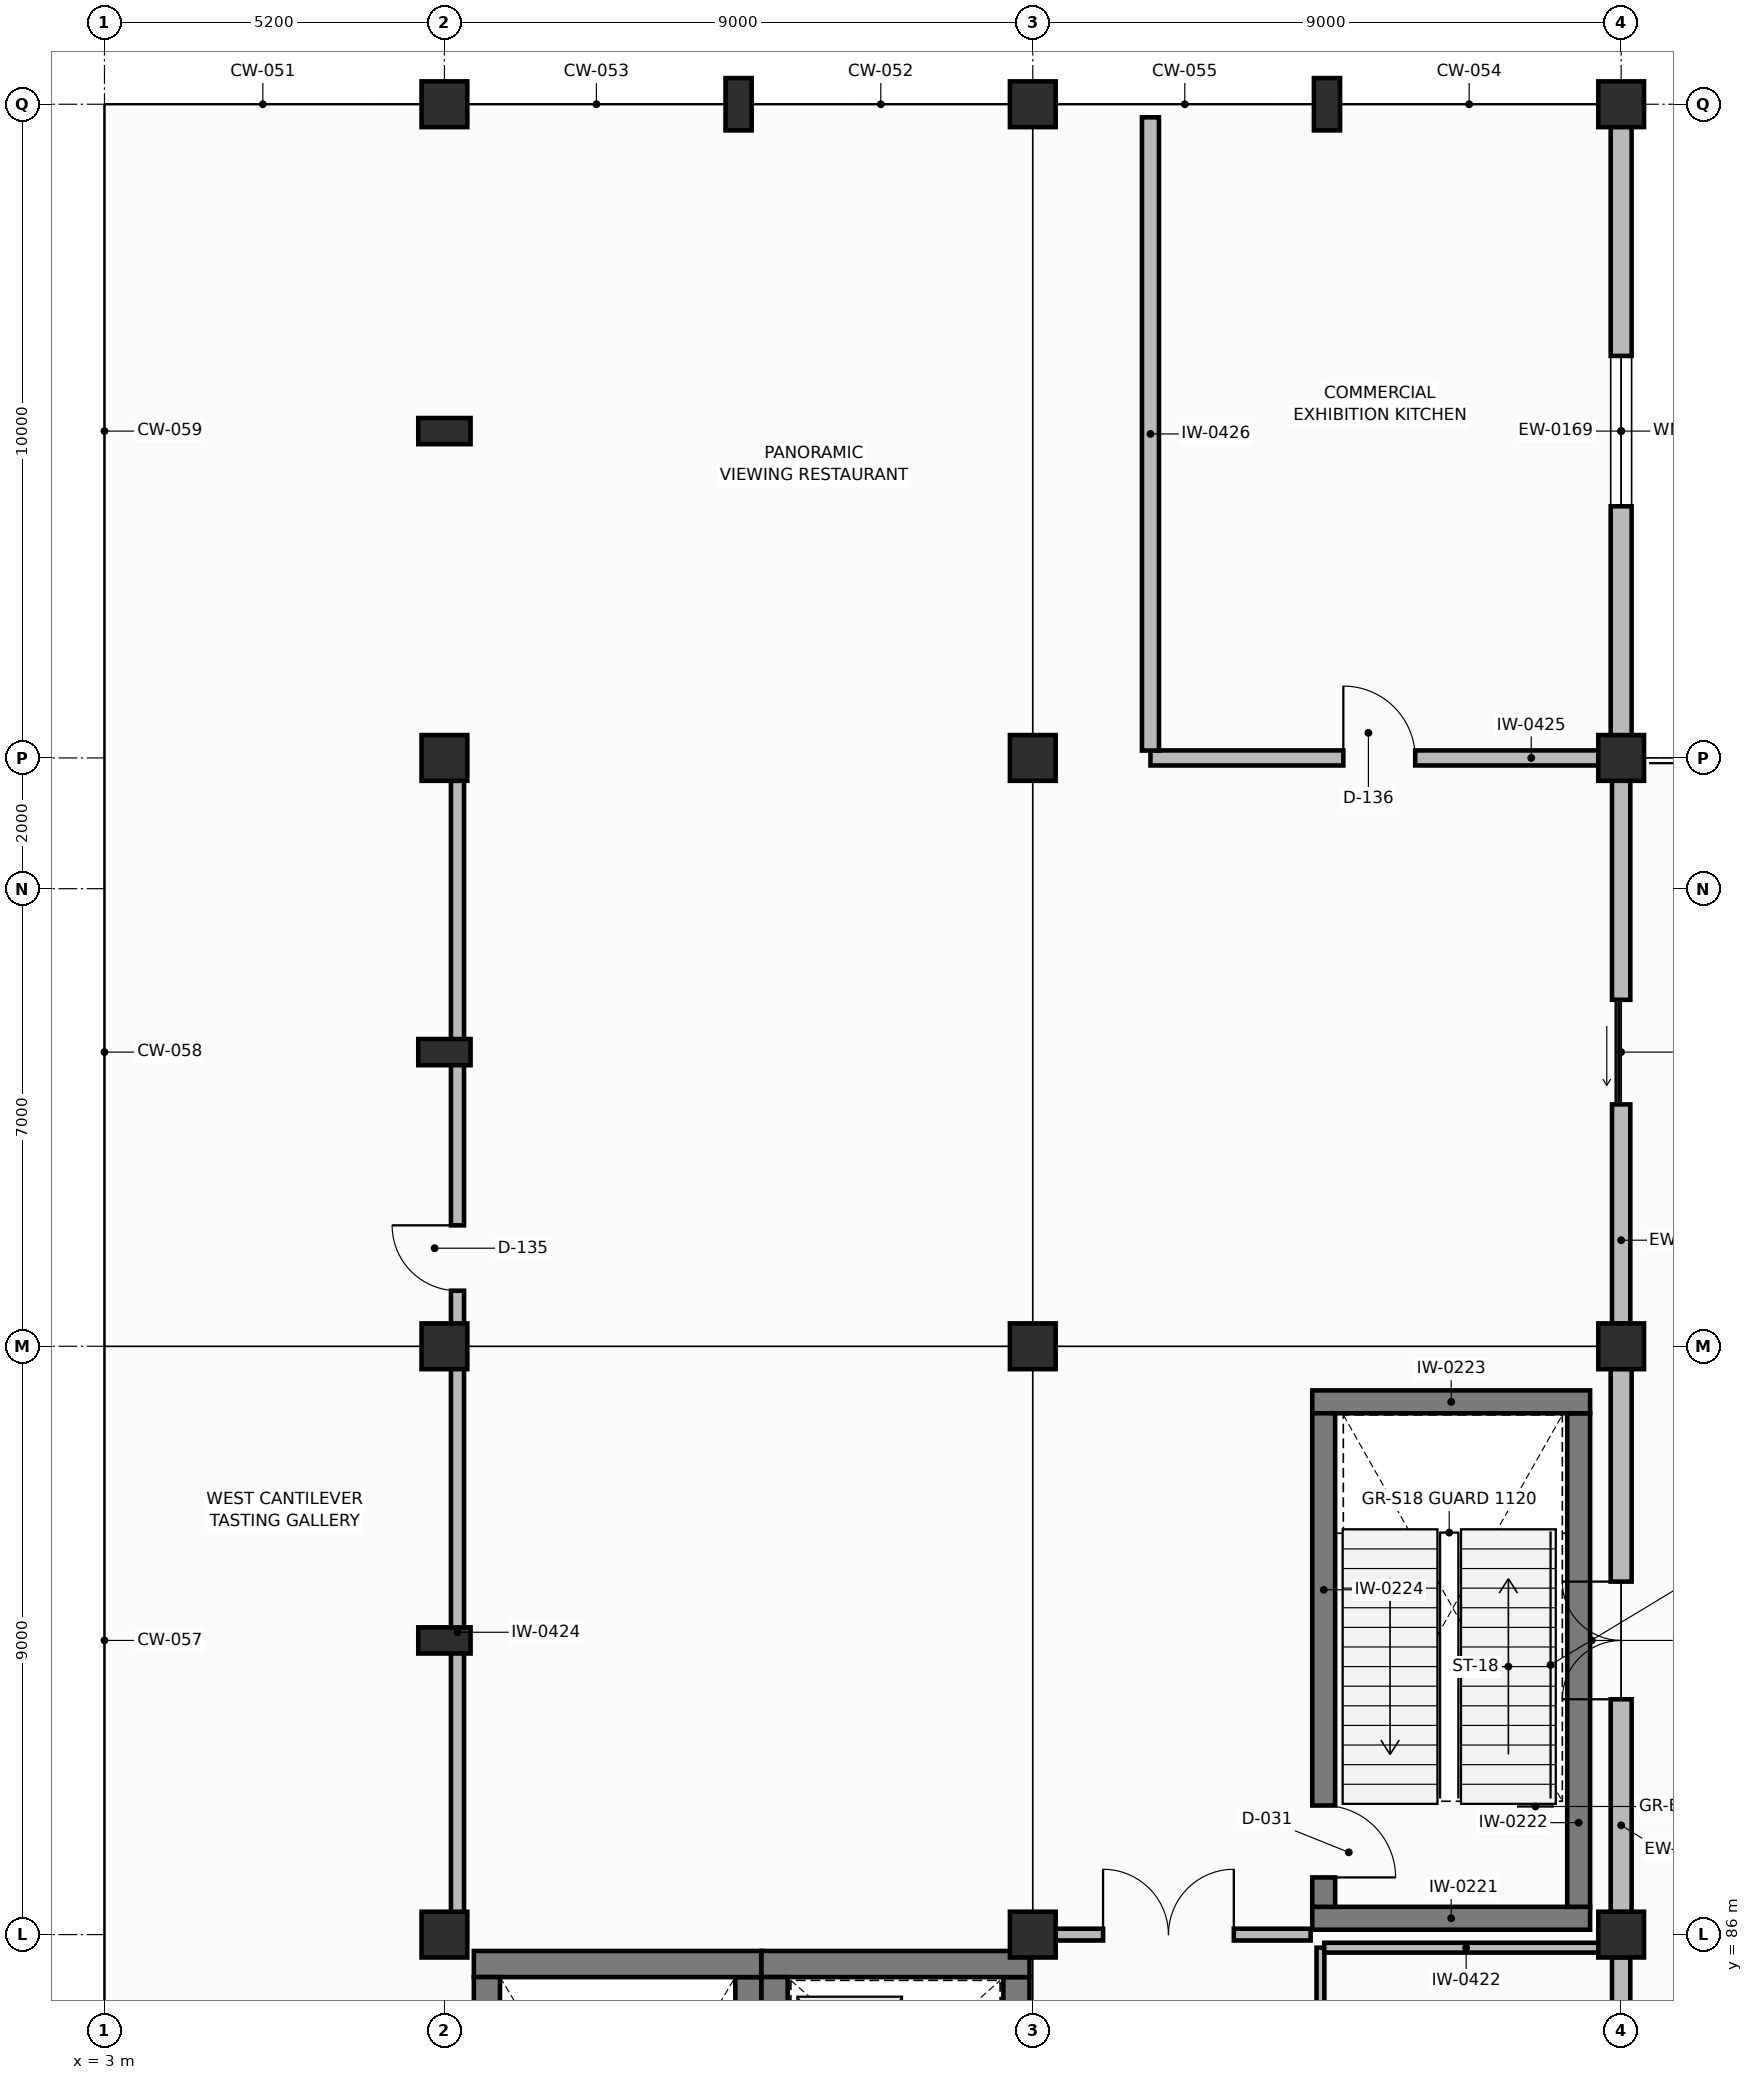
"""IFC4 building model, lengths in metres.
Left out: names, types, materials, properties, quantities, classifications, styles, units other than length and angle.
Written with IfcOpenShell. Run it as: python <this file> out.ifc"""

import sys

from ifc_helpers import new_model, si_unit, direction, frame, frame_2d, origin, origin_2d, place, context, subcontext, project, spatial, rectangle, extrude, element, fill, save


model = new_model("IFC4")
c1 = context("Model", 3, precision=1e-05, world=origin(), true_north=direction((0.0, 1.0)))
c2 = subcontext(c1, "Body", "Model", "MODEL_VIEW")
j1 = project(units=[si_unit("LENGTHUNIT", "METRE"), si_unit("PLANEANGLEUNIT", "RADIAN")], contexts=[c1])
p1 = place(None, origin())
s1 = spatial("IfcSite", under=j1, at=p1, CompositionType="ELEMENT")
p2 = place(p1, origin())
s2 = spatial("IfcBuilding", under=s1, at=p2, CompositionType="ELEMENT")
p3 = place(p2, frame((0.0, 0.0, 14.4)))
s3 = spatial("IfcBuildingStorey", under=s2, at=p3, CompositionType="ELEMENT", Elevation=14.4)
for number, where, z_axis, x_axis in (
    (1, (8.2, 86.0, 0.0), (0.0, 0.0, 1.0), (1.0, 0.0, 0.0)),
    (2, (8.2, 95.0, 0.0), (0.0, 0.0, 1.0), (1.0, 0.0, 0.0)),
    (3, (8.2, 104.0, 0.0), (0.0, 0.0, 1.0), (1.0, 0.0, 0.0)),
    (4, (8.2, 114.0, 0.0), (0.0, 0.0, 1.0), (1.0, 0.0, 0.0)),
    (5, (17.2, 86.0, 0.0), (0.0, 0.0, 1.0), (1.0, 0.0, 0.0)),
    (6, (17.2, 95.0, 0.0), (0.0, 0.0, 1.0), (1.0, 0.0, 0.0)),
    (7, (17.2, 104.0, 0.0), (0.0, 0.0, 1.0), (1.0, 0.0, 0.0)),
    (8, (17.2, 114.0, 0.0), (0.0, 0.0, 1.0), (1.0, 0.0, 0.0)),
    (9, (26.2, 86.0, 0.0), (0.0, 0.0, 1.0), (1.0, 0.0, 0.0)),
    (10, (26.2, 95.0, 0.0), (0.0, 0.0, 1.0), (1.0, 0.0, 0.0)),
    (11, (26.2, 104.0, 0.0), (0.0, 0.0, 1.0), (1.0, 0.0, 0.0)),
    (12, (26.2, 114.0, 0.0), (0.0, 0.0, 1.0), (1.0, 0.0, 0.0)),
):
    element("IfcColumn", number, at=place(p3, frame(where, z_axis=z_axis, x_axis=x_axis)), inside=s3, PredefinedType="COLUMN", context=c2, shape_type="SweptSolid", body=[
        extrude(rectangle(XDim=0.7, YDim=0.7, at=origin_2d()), origin(), (0.0, 0.0, 1.0), 4.5),
    ])
for number, where, z_axis, x_axis in (
    (13, (12.7, 114.0, 0.0), (0.0, 0.0, 1.0), (1.0, 0.0, 0.0)),
    (14, (21.7, 114.0, 0.0), (0.0, 0.0, 1.0), (1.0, 0.0, 0.0)),
    (15, (8.2, 90.5, 0.0), (0.0, 0.0, 1.0), (0.0, 1.0, 0.0)),
    (16, (8.2, 99.5, 0.0), (0.0, 0.0, 1.0), (0.0, 1.0, 0.0)),
    (17, (8.2, 109.0, 0.0), (0.0, 0.0, 1.0), (0.0, 1.0, 0.0)),
):
    element("IfcColumn", number, at=place(p3, frame(where, z_axis=z_axis, x_axis=x_axis)), inside=s3, PredefinedType="PILASTER", context=c2, shape_type="SweptSolid", body=[
        extrude(rectangle(XDim=0.4, YDim=0.8, at=origin_2d()), origin(), (0.0, 0.0, 1.0), 4.5),
    ])
p4 = place(p3, frame((26.2, 77.345, 0.0), z_axis=(0.0, 0.0, 1.0), x_axis=(0.0, 1.0, 0.0)))
e18 = element("IfcWall", 18, at=p4, inside=s3, PredefinedType="SOLIDWALL", context=c2, shape_type="SweptSolid", body=[
    extrude(rectangle(XDim=8.31, YDim=0.28, at=frame_2d((4.155, 0.0))), origin(), (0.0, 0.0, 1.0), 3.472),
])
p5 = place(p4, frame((3.205, 0.0, 0.9)))
e19 = element("IfcOpeningElement", 19, at=p5, cuts=e18, PredefinedType="OPENING", context=c2, shape_type="SweptSolid", body=[
    extrude(rectangle(XDim=1.9, YDim=1.55, at=frame_2d((0.95, 0.775))), frame((0.0, 0.15, 0.0), z_axis=(0.0, -1.0, 0.0), x_axis=(1.0, 0.0, 0.0)), (0.0, 0.0, 1.0), 0.3),
])
p6 = place(p3, frame((26.2, 86.345, 0.0), z_axis=(0.0, 0.0, 1.0), x_axis=(0.0, 1.0, 0.0)))
e20 = element("IfcWall", 20, at=p6, inside=s3, PredefinedType="SOLIDWALL", context=c2, shape_type="SweptSolid", body=[
    extrude(rectangle(XDim=8.31, YDim=0.32, at=frame_2d((4.155, 0.0))), origin(), (0.0, 0.0, 1.0), 3.472),
])
p7 = place(p6, frame((3.255, 0.0, 0.0)))
e21 = element("IfcOpeningElement", 21, at=p7, cuts=e20, PredefinedType="OPENING", context=c2, shape_type="SweptSolid", body=[
    extrude(rectangle(XDim=1.8, YDim=2.3, at=frame_2d((0.9, 1.15))), frame((0.0, 0.17, 0.0), z_axis=(0.0, -1.0, 0.0), x_axis=(1.0, 0.0, 0.0)), (0.0, 0.0, 1.0), 0.34),
])
p8 = place(p3, frame((26.2, 95.345, 0.0), z_axis=(0.0, 0.0, 1.0), x_axis=(0.0, 1.0, 0.0)))
e22 = element("IfcWall", 22, at=p8, inside=s3, PredefinedType="SOLIDWALL", context=c2, shape_type="SweptSolid", body=[
    extrude(rectangle(XDim=8.31, YDim=0.28, at=frame_2d((4.155, 0.0))), origin(), (0.0, 0.0, 1.0), 3.387),
])
p9 = place(p8, frame((3.355, 0.0, 0.0)))
e23 = element("IfcOpeningElement", 23, at=p9, cuts=e22, PredefinedType="OPENING", context=c2, shape_type="SweptSolid", body=[
    extrude(rectangle(XDim=1.6, YDim=2.3, at=frame_2d((0.8, 1.15))), frame((0.0, 0.15, 0.0), z_axis=(0.0, -1.0, 0.0), x_axis=(1.0, 0.0, 0.0)), (0.0, 0.0, 1.0), 0.3),
])
p10 = place(p3, frame((26.2, 104.345, 0.0), z_axis=(0.0, 0.0, 1.0), x_axis=(0.0, 1.0, 0.0)))
e24 = element("IfcWall", 24, at=p10, inside=s3, PredefinedType="SOLIDWALL", context=c2, shape_type="SweptSolid", body=[
    extrude(rectangle(XDim=9.31, YDim=0.32, at=frame_2d((4.655, 0.0))), origin(), (0.0, 0.0, 1.0), 3.387),
])
p11 = place(p10, frame((3.505, 0.0, 0.9)))
e25 = element("IfcOpeningElement", 25, at=p11, cuts=e24, PredefinedType="OPENING", context=c2, shape_type="SweptSolid", body=[
    extrude(rectangle(XDim=2.3, YDim=1.5, at=frame_2d((1.15, 0.75))), frame((0.0, 0.17, 0.0), z_axis=(0.0, -1.0, 0.0), x_axis=(1.0, 0.0, 0.0)), (0.0, 0.0, 1.0), 0.34),
])
p12 = place(p3, frame((12.85, 77.75, 0.0), z_axis=(0.0, 0.0, 1.0), x_axis=(0.0, 1.0, 0.0)))
e26 = element("IfcWall", 26, at=p12, inside=s3, PredefinedType="SHEAR", context=c2, shape_type="SweptSolid", body=[
    extrude(rectangle(XDim=7.6, YDim=0.4, at=frame_2d((3.8, 0.0))), origin(), (0.0, 0.0, 1.0), 4.19),
])
p13 = place(p12, frame((0.35, 0.0, 0.0)))
e27 = element("IfcOpeningElement", 27, at=p13, cuts=e26, PredefinedType="OPENING", context=c2, shape_type="SweptSolid", body=[
    extrude(rectangle(XDim=1.1, YDim=2.2, at=frame_2d((0.55, 1.1))), frame((0.0, 0.21, 0.0), z_axis=(0.0, -1.0, 0.0), x_axis=(1.0, 0.0, 0.0)), (0.0, 0.0, 1.0), 0.42),
])
p14 = place(p3, frame((13.05, 85.55, 0.0), z_axis=(0.0, 0.0, 1.0), x_axis=(-1.0, 0.0, 0.0)))
e28 = element("IfcWall", 28, at=p14, inside=s3, PredefinedType="SHEAR", context=c2, shape_type="SweptSolid", body=[
    extrude(rectangle(XDim=4.4, YDim=0.4, at=frame_2d((2.2, 0.0))), origin(), (0.0, 0.0, 1.0), 4.19),
])
p15 = place(p3, frame((8.85, 85.35, 0.0), z_axis=(0.0, 0.0, 1.0), x_axis=(0.0, -1.0, 0.0)))
e29 = element("IfcWall", 29, at=p15, inside=s3, PredefinedType="SHEAR", context=c2, shape_type="SweptSolid", body=[
    extrude(rectangle(XDim=7.6, YDim=0.4, at=frame_2d((3.8, 0.0))), origin(), (0.0, 0.0, 1.0), 4.19),
])
p16 = place(p3, frame((16.95, 82.4, 0.0), z_axis=(0.0, 0.0, 1.0), x_axis=(0.0, 1.0, 0.0)))
e30 = element("IfcWall", 30, at=p16, inside=s3, PredefinedType="SHEAR", context=c2, shape_type="SweptSolid", body=[
    extrude(rectangle(XDim=2.95, YDim=0.4, at=frame_2d((1.475, 0.0))), origin(), (0.0, 0.0, 1.0), 4.19),
])
p17 = place(p3, frame((17.15, 85.55, 0.0), z_axis=(0.0, 0.0, 1.0), x_axis=(-1.0, 0.0, 0.0)))
e31 = element("IfcWall", 31, at=p17, inside=s3, PredefinedType="SHEAR", context=c2, shape_type="SweptSolid", body=[
    extrude(rectangle(XDim=4.1, YDim=0.4, at=frame_2d((2.05, 0.0))), origin(), (0.0, 0.0, 1.0), 4.19),
])
p18 = place(p3, frame((13.25, 85.35, 0.0), z_axis=(0.0, 0.0, 1.0), x_axis=(0.0, -1.0, 0.0)))
e32 = element("IfcWall", 32, at=p18, inside=s3, PredefinedType="SHEAR", context=c2, shape_type="SweptSolid", body=[
    extrude(rectangle(XDim=2.95, YDim=0.4, at=frame_2d((1.475, 0.0))), origin(), (0.0, 0.0, 1.0), 4.19),
])
p19 = place(p3, frame((21.475, 86.25, 0.0), z_axis=(0.0, 0.0, 1.0), x_axis=(1.0, 0.0, 0.0)))
e33 = element("IfcWall", 33, at=p19, inside=s3, PredefinedType="SHEAR", context=c2, shape_type="SweptSolid", body=[
    extrude(rectangle(XDim=4.25, YDim=0.35, at=frame_2d((2.125, 0.0))), origin(), (0.0, 0.0, 1.0), 4.19),
])
p20 = place(p3, frame((25.55, 86.425, 0.0), z_axis=(0.0, 0.0, 1.0), x_axis=(0.0, 1.0, 0.0)))
e34 = element("IfcWall", 34, at=p20, inside=s3, PredefinedType="SHEAR", context=c2, shape_type="SweptSolid", body=[
    extrude(rectangle(XDim=7.55, YDim=0.35, at=frame_2d((3.775, 0.0))), origin(), (0.0, 0.0, 1.0), 4.19),
])
p21 = place(p3, frame((25.725, 94.15, 0.0), z_axis=(0.0, 0.0, 1.0), x_axis=(-1.0, 0.0, 0.0)))
e35 = element("IfcWall", 35, at=p21, inside=s3, PredefinedType="SHEAR", context=c2, shape_type="SweptSolid", body=[
    extrude(rectangle(XDim=4.25, YDim=0.35, at=frame_2d((2.125, 0.0))), origin(), (0.0, 0.0, 1.0), 4.19),
])
p22 = place(p3, frame((21.65, 93.975, 0.0), z_axis=(0.0, 0.0, 1.0), x_axis=(0.0, -1.0, 0.0)))
e36 = element("IfcWall", 36, at=p22, inside=s3, PredefinedType="SHEAR", context=c2, shape_type="SweptSolid", body=[
    extrude(rectangle(XDim=7.55, YDim=0.35, at=frame_2d((3.775, 0.0))), origin(), (0.0, 0.0, 1.0), 4.19),
])
p23 = place(p22, frame((6.0, 0.0, 0.0)))
e37 = element("IfcOpeningElement", 37, at=p23, cuts=e36, PredefinedType="OPENING", context=c2, shape_type="SweptSolid", body=[
    extrude(rectangle(XDim=1.1, YDim=2.2, at=frame_2d((0.55, 1.1))), frame((0.0, 0.185, 0.0), z_axis=(0.0, -1.0, 0.0), x_axis=(1.0, 0.0, 0.0)), (0.0, 0.0, 1.0), 0.37),
])
p24 = place(p3, frame((21.6, 77.2, 0.0), z_axis=(0.0, 0.0, 1.0), x_axis=(0.0, 1.0, 0.0)))
e38 = element("IfcWall", 38, at=p24, inside=s3, PredefinedType="PARTITIONING", context=c2, shape_type="SweptSolid", body=[
    extrude(rectangle(XDim=8.6, YDim=0.12, at=frame_2d((4.3, 0.0))), origin(), (0.0, 0.0, 1.0), 3.462),
])
p25 = place(p24, frame((3.775, 0.0, 0.0)))
e39 = element("IfcOpeningElement", 39, at=p25, cuts=e38, PredefinedType="OPENING", context=c2, shape_type="SweptSolid", body=[
    extrude(rectangle(XDim=1.05, YDim=2.15, at=frame_2d((0.525, 1.075))), frame((0.0, 0.07, 0.0), z_axis=(0.0, -1.0, 0.0), x_axis=(1.0, 0.0, 0.0)), (0.0, 0.0, 1.0), 0.14),
])
p26 = place(p3, frame((21.658, 85.8, 0.0), z_axis=(0.0, 0.0, 1.0), x_axis=(1.0, 0.0, 0.0)))
e40 = element("IfcWall", 40, at=p26, inside=s3, PredefinedType="PARTITIONING", context=c2, shape_type="SweptSolid", body=[
    extrude(rectangle(XDim=4.342, YDim=0.15, at=frame_2d((2.171, 0.0))), origin(), (0.0, 0.0, 1.0), 3.462),
])
p27 = place(p3, frame((17.1, 86.0, 0.0), z_axis=(0.0, 0.0, 1.0), x_axis=(1.0, 0.0, 0.0)))
e41 = element("IfcWall", 41, at=p27, inside=s3, PredefinedType="STANDARD", context=c2, shape_type="SweptSolid", body=[
    extrude(rectangle(XDim=4.35, YDim=0.18, at=frame_2d((2.175, 0.0))), origin(), (0.0, 0.0, 1.0), 3.304),
])
p28 = place(p27, frame((1.175, 0.0, 0.0)))
e42 = element("IfcOpeningElement", 42, at=p28, cuts=e41, PredefinedType="OPENING", context=c2, shape_type="SweptSolid", body=[
    extrude(rectangle(XDim=2.0, YDim=2.4, at=frame_2d((1.0, 1.2))), frame((0.0, 0.1, 0.0), z_axis=(0.0, -1.0, 0.0), x_axis=(1.0, 0.0, 0.0)), (0.0, 0.0, 1.0), 0.2),
])
p29 = place(p3, frame((8.4, 86.0, 0.0), z_axis=(0.0, 0.0, 1.0), x_axis=(0.0, 1.0, 0.0)))
e43 = element("IfcWall", 43, at=p29, inside=s3, PredefinedType="PARTITIONING", context=c2, shape_type="SweptSolid", body=[
    extrude(rectangle(XDim=18.0, YDim=0.2, at=frame_2d((9.0, 0.0))), origin(), (0.0, 0.0, 1.0), 3.219),
])
p30 = place(p29, frame((9.85, 0.0, 0.0)))
e44 = element("IfcOpeningElement", 44, at=p30, cuts=e43, PredefinedType="OPENING", context=c2, shape_type="SweptSolid", body=[
    extrude(rectangle(XDim=1.0, YDim=2.15, at=frame_2d((0.5, 1.075))), frame((0.0, 0.11, 0.0), z_axis=(0.0, -1.0, 0.0), x_axis=(1.0, 0.0, 0.0)), (0.0, 0.0, 1.0), 0.22),
])
p31 = place(p3, frame((19.0, 104.0, 0.0), z_axis=(0.0, 0.0, 1.0), x_axis=(1.0, 0.0, 0.0)))
e45 = element("IfcWall", 45, at=p31, inside=s3, PredefinedType="PARTITIONING", context=c2, shape_type="SweptSolid", body=[
    extrude(rectangle(XDim=7.0, YDim=0.23, at=frame_2d((3.5, 0.0))), origin(), (0.0, 0.0, 1.0), 3.377),
])
p32 = place(p31, frame((2.95, 0.0, 0.0)))
e46 = element("IfcOpeningElement", 46, at=p32, cuts=e45, PredefinedType="OPENING", context=c2, shape_type="SweptSolid", body=[
    extrude(rectangle(XDim=1.1, YDim=2.2, at=frame_2d((0.55, 1.1))), frame((0.0, 0.125, 0.0), z_axis=(0.0, -1.0, 0.0), x_axis=(1.0, 0.0, 0.0)), (0.0, 0.0, 1.0), 0.25),
])
p33 = place(p3, frame((19.0, 104.113, 0.0), z_axis=(0.0, 0.0, 1.0), x_axis=(0.0, 1.0, 0.0)))
e47 = element("IfcWall", 47, at=p33, inside=s3, PredefinedType="PARTITIONING", context=c2, shape_type="SweptSolid", body=[
    extrude(rectangle(XDim=9.687, YDim=0.26, at=frame_2d((4.844, 0.0))), origin(), (0.0, 0.0, 1.0), 3.377),
])
p34 = place(p7, origin())
e48 = element("IfcDoor", 48, at=p34, inside=s3, OperationType="DOUBLE_SWING_RIGHT", PredefinedType="DOOR", context=c2, shape_type="SweptSolid", body=[
    extrude(rectangle(XDim=1.8, YDim=2.3, at=frame_2d((0.9, 1.15))), frame((0.0, 0.025, 0.0), z_axis=(0.0, -1.0, 0.0), x_axis=(1.0, 0.0, 0.0)), (0.0, 0.0, 1.0), 0.05),
])
fill(e21, e48)
p35 = place(p9, origin())
e49 = element("IfcDoor", 49, at=p35, inside=s3, OperationType="SLIDING_TO_LEFT", PredefinedType="DOOR", context=c2, shape_type="SweptSolid", body=[
    extrude(rectangle(XDim=1.6, YDim=2.3, at=frame_2d((0.8, 1.15))), frame((0.0, 0.025, 0.0), z_axis=(0.0, -1.0, 0.0), x_axis=(1.0, 0.0, 0.0)), (0.0, 0.0, 1.0), 0.05),
])
fill(e23, e49)
p36 = place(p11, origin())
e50 = element("IfcWindow", 50, at=p36, inside=s3, PartitioningType="SINGLE_PANEL", PredefinedType="WINDOW", context=c2, shape_type="SweptSolid", body=[
    extrude(rectangle(XDim=2.3, YDim=1.5, at=frame_2d((1.15, 0.75))), frame((0.0, 0.03, 0.0), z_axis=(0.0, -1.0, 0.0), x_axis=(1.0, 0.0, 0.0)), (0.0, 0.0, 1.0), 0.06),
])
fill(e25, e50)
p37 = place(p23, origin())
e51 = element("IfcDoor", 51, at=p37, inside=s3, OperationType="SINGLE_SWING_RIGHT", PredefinedType="DOOR", context=c2, shape_type="SweptSolid", body=[
    extrude(rectangle(XDim=1.1, YDim=2.2, at=frame_2d((0.55, 1.1))), frame((0.0, 0.025, 0.0), z_axis=(0.0, -1.0, 0.0), x_axis=(1.0, 0.0, 0.0)), (0.0, 0.0, 1.0), 0.05),
])
fill(e37, e51)
p38 = place(p28, origin())
e52 = element("IfcDoor", 52, at=p38, inside=s3, OperationType="DOUBLE_DOOR_SINGLE_SWING", PredefinedType="DOOR", context=c2, shape_type="SweptSolid", body=[
    extrude(rectangle(XDim=2.0, YDim=2.4, at=frame_2d((1.0, 1.2))), frame((0.0, 0.025, 0.0), z_axis=(0.0, -1.0, 0.0), x_axis=(1.0, 0.0, 0.0)), (0.0, 0.0, 1.0), 0.05),
])
fill(e42, e52)
p39 = place(p30, origin())
e53 = element("IfcDoor", 53, at=p39, inside=s3, OperationType="SINGLE_SWING_RIGHT", PredefinedType="DOOR", context=c2, shape_type="SweptSolid", body=[
    extrude(rectangle(XDim=1.0, YDim=2.15, at=frame_2d((0.5, 1.075))), frame((0.0, 0.025, 0.0), z_axis=(0.0, -1.0, 0.0), x_axis=(1.0, 0.0, 0.0)), (0.0, 0.0, 1.0), 0.05),
])
fill(e44, e53)
p40 = place(p32, origin())
e54 = element("IfcDoor", 54, at=p40, inside=s3, OperationType="SINGLE_SWING_LEFT", PredefinedType="DOOR", context=c2, shape_type="SweptSolid", body=[
    extrude(rectangle(XDim=1.1, YDim=2.2, at=frame_2d((0.55, 1.1))), frame((0.0, 0.025, 0.0), z_axis=(0.0, -1.0, 0.0), x_axis=(1.0, 0.0, 0.0)), (0.0, 0.0, 1.0), 0.05),
])
fill(e46, e54)
save(model, sys.argv[1])
